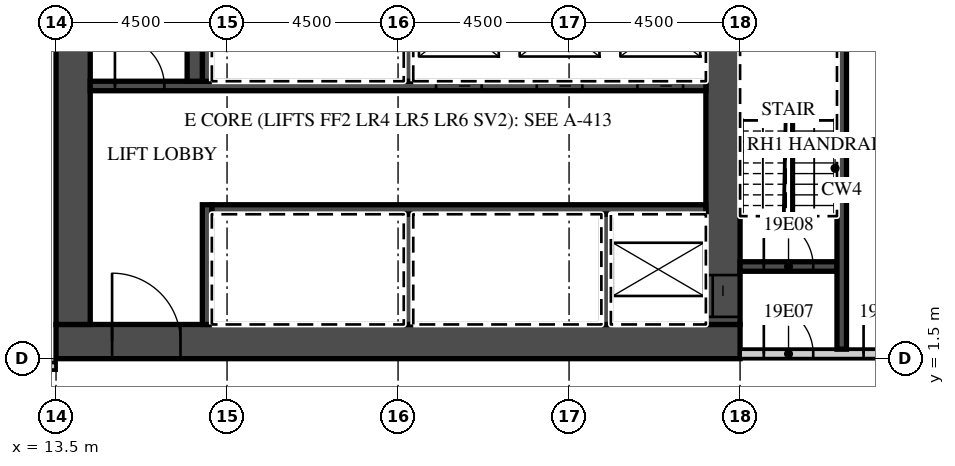
"""IFC4 building model, lengths in metres.
Left out: names, types, materials, properties, quantities, classifications, styles, units other than length and angle.
Written with IfcOpenShell. Run it as: python <this file> out.ifc"""

import sys

from ifc_helpers import new_model, si_unit, direction, frame, frame_2d, origin, place, context, subcontext, project, spatial, rectangle, extrude, element, fill, save


model = new_model("IFC4")
c1 = context("Model", 3, precision=1e-05, world=origin(), true_north=direction((0.0, 1.0)))
c2 = subcontext(c1, "Body", "Model", "MODEL_VIEW")
j1 = project(units=[si_unit("LENGTHUNIT", "METRE"), si_unit("PLANEANGLEUNIT", "RADIAN")], contexts=[c1])
p1 = place(None, origin())
s1 = spatial("IfcSite", under=j1, at=p1, CompositionType="ELEMENT")
p2 = place(p1, origin())
s2 = spatial("IfcBuilding", under=s1, at=p2, CompositionType="ELEMENT")
p3 = place(p2, frame((0.0, 0.0, 93.0)))
s3 = spatial("IfcBuildingStorey", under=s2, at=p3, CompositionType="ELEMENT", Elevation=93.0)
p4 = place(p3, frame((-44.55, 1.3, 0.0), z_axis=(0.0, 0.0, 1.0), x_axis=(1.0, 0.0, 0.0)))
e1 = element("IfcWall", 1, at=p4, inside=s3, PredefinedType="PARTITIONING", context=c2, shape_type="SweptSolid", body=[
    extrude(rectangle(XDim=58.05, YDim=0.2, at=frame_2d((29.025, 0.0))), origin(), (0.0, 0.0, 1.0), 3.02),
])
p5 = place(p4, frame((0.525, 0.0, 0.0)))
e2 = element("IfcOpeningElement", 2, at=p5, cuts=e1, PredefinedType="OPENING", context=c2, shape_type="SweptSolid", body=[
    extrude(rectangle(XDim=1.0, YDim=2.1, at=frame_2d((0.5, 1.05))), frame((0.0, 0.11, 0.0), z_axis=(0.0, -1.0, 0.0), x_axis=(1.0, 0.0, 0.0)), (0.0, 0.0, 1.0), 0.22),
])
p6 = place(p4, frame((4.625, 0.0, 0.0)))
e3 = element("IfcOpeningElement", 3, at=p6, cuts=e1, PredefinedType="OPENING", context=c2, shape_type="SweptSolid", body=[
    extrude(rectangle(XDim=1.0, YDim=2.1, at=frame_2d((0.5, 1.05))), frame((0.0, 0.11, 0.0), z_axis=(0.0, -1.0, 0.0), x_axis=(1.0, 0.0, 0.0)), (0.0, 0.0, 1.0), 0.22),
])
p7 = place(p4, frame((10.987, 0.0, 0.0)))
e4 = element("IfcOpeningElement", 4, at=p7, cuts=e1, PredefinedType="OPENING", context=c2, shape_type="SweptSolid", body=[
    extrude(rectangle(XDim=1.2, YDim=2.1, at=frame_2d((0.6, 1.05))), frame((0.0, 0.11, 0.0), z_axis=(0.0, -1.0, 0.0), x_axis=(1.0, 0.0, 0.0)), (0.0, 0.0, 1.0), 0.22),
])
p8 = place(p4, frame((22.912, 0.0, 0.0)))
e5 = element("IfcOpeningElement", 5, at=p8, cuts=e1, PredefinedType="OPENING", context=c2, shape_type="SweptSolid", body=[
    extrude(rectangle(XDim=1.2, YDim=2.1, at=frame_2d((0.6, 1.05))), frame((0.0, 0.11, 0.0), z_axis=(0.0, -1.0, 0.0), x_axis=(1.0, 0.0, 0.0)), (0.0, 0.0, 1.0), 0.22),
])
p9 = place(p4, frame((28.987, 0.0, 0.0)))
e6 = element("IfcOpeningElement", 6, at=p9, cuts=e1, PredefinedType="OPENING", context=c2, shape_type="SweptSolid", body=[
    extrude(rectangle(XDim=1.2, YDim=2.1, at=frame_2d((0.6, 1.05))), frame((0.0, 0.11, 0.0), z_axis=(0.0, -1.0, 0.0), x_axis=(1.0, 0.0, 0.0)), (0.0, 0.0, 1.0), 0.22),
])
p10 = place(p4, frame((36.125, 0.0, 0.0)))
e7 = element("IfcOpeningElement", 7, at=p10, cuts=e1, PredefinedType="OPENING", context=c2, shape_type="SweptSolid", body=[
    extrude(rectangle(XDim=1.0, YDim=2.1, at=frame_2d((0.5, 1.05))), frame((0.0, 0.11, 0.0), z_axis=(0.0, -1.0, 0.0), x_axis=(1.0, 0.0, 0.0)), (0.0, 0.0, 1.0), 0.22),
])
p11 = place(p4, frame((42.975, 0.0, 0.0)))
e8 = element("IfcOpeningElement", 8, at=p11, cuts=e1, PredefinedType="OPENING", context=c2, shape_type="SweptSolid", body=[
    extrude(rectangle(XDim=1.0, YDim=2.1, at=frame_2d((0.5, 1.05))), frame((0.0, 0.11, 0.0), z_axis=(0.0, -1.0, 0.0), x_axis=(1.0, 0.0, 0.0)), (0.0, 0.0, 1.0), 0.22),
])
p12 = place(p4, frame((47.5, 0.0, 0.0)))
e9 = element("IfcOpeningElement", 9, at=p12, cuts=e1, PredefinedType="OPENING", context=c2, shape_type="SweptSolid", body=[
    extrude(rectangle(XDim=1.0, YDim=2.1, at=frame_2d((0.5, 1.05))), frame((0.0, 0.11, 0.0), z_axis=(0.0, -1.0, 0.0), x_axis=(1.0, 0.0, 0.0)), (0.0, 0.0, 1.0), 0.22),
])
p13 = place(p4, frame((49.6, 0.0, 0.0)))
e10 = element("IfcOpeningElement", 10, at=p13, cuts=e1, PredefinedType="OPENING", context=c2, shape_type="SweptSolid", body=[
    extrude(rectangle(XDim=1.0, YDim=2.1, at=frame_2d((0.5, 1.05))), frame((0.0, 0.11, 0.0), z_axis=(0.0, -1.0, 0.0), x_axis=(1.0, 0.0, 0.0)), (0.0, 0.0, 1.0), 0.22),
])
p14 = place(p4, frame((56.475, 0.0, 0.0)))
e11 = element("IfcOpeningElement", 11, at=p14, cuts=e1, PredefinedType="OPENING", context=c2, shape_type="SweptSolid", body=[
    extrude(rectangle(XDim=1.0, YDim=2.1, at=frame_2d((0.5, 1.05))), frame((0.0, 0.11, 0.0), z_axis=(0.0, -1.0, 0.0), x_axis=(1.0, 0.0, 0.0)), (0.0, 0.0, 1.0), 0.22),
])
p15 = place(p3, frame((13.5, 1.95, 0.0), z_axis=(0.0, 0.0, 1.0), x_axis=(1.0, 0.0, 0.0)))
e12 = element("IfcWall", 12, at=p15, inside=s3, PredefinedType="SHEAR", context=c2, shape_type="SweptSolid", body=[
    extrude(rectangle(XDim=18.0, YDim=0.9, at=frame_2d((9.0, 0.0))), origin(), (0.0, 0.0, 1.0), 3.02),
])
p16 = place(p15, frame((1.475, 0.0, 0.0)))
e13 = element("IfcOpeningElement", 13, at=p16, cuts=e12, PredefinedType="OPENING", context=c2, shape_type="SweptSolid", body=[
    extrude(rectangle(XDim=1.8, YDim=2.1, at=frame_2d((0.9, 1.05))), frame((0.0, 0.46, 0.0), z_axis=(0.0, -1.0, 0.0), x_axis=(1.0, 0.0, 0.0)), (0.0, 0.0, 1.0), 0.92),
])
p17 = place(p3, frame((31.05, 2.4, 0.0), z_axis=(0.0, 0.0, 1.0), x_axis=(0.0, 1.0, 0.0)))
e14 = element("IfcWall", 14, at=p17, inside=s3, PredefinedType="SHEAR", context=c2, shape_type="SweptSolid", body=[
    extrude(rectangle(XDim=12.8, YDim=0.9, at=frame_2d((6.4, 0.0))), origin(), (0.0, 0.0, 1.0), 3.02),
])
p18 = place(p17, frame((0.2, 0.0, 0.0)))
e15 = element("IfcOpeningElement", 15, at=p18, cuts=e14, PredefinedType="OPENING", context=c2, shape_type="SweptSolid", body=[
    extrude(rectangle(XDim=1.1, YDim=2.1, at=frame_2d((0.55, 1.05))), frame((0.0, 0.46, 0.0), z_axis=(0.0, -1.0, 0.0), x_axis=(1.0, 0.0, 0.0)), (0.0, 0.0, 1.0), 0.92),
])
p19 = place(p3, frame((13.95, 2.4, 0.0), z_axis=(0.0, 0.0, 1.0), x_axis=(0.0, 1.0, 0.0)))
e16 = element("IfcWall", 16, at=p19, inside=s3, PredefinedType="SHEAR", context=c2, shape_type="SweptSolid", body=[
    extrude(rectangle(XDim=12.2, YDim=0.9, at=frame_2d((6.1, 0.0))), origin(), (0.0, 0.0, 1.0), 3.02),
])
p20 = place(p3, frame((17.6, 5.425, 0.0), z_axis=(0.0, 0.0, 1.0), x_axis=(1.0, 0.0, 0.0)))
e17 = element("IfcWall", 17, at=p20, inside=s3, PredefinedType="SHEAR", context=c2, shape_type="SweptSolid", body=[
    extrude(rectangle(XDim=13.0, YDim=0.25, at=frame_2d((6.5, 0.0))), origin(), (0.0, 0.0, 1.0), 3.02),
])
p21 = place(p3, frame((17.475, 2.4, 0.0), z_axis=(0.0, 0.0, 1.0), x_axis=(0.0, 1.0, 0.0)))
e18 = element("IfcWall", 18, at=p21, inside=s3, PredefinedType="SHEAR", context=c2, shape_type="SweptSolid", body=[
    extrude(rectangle(XDim=3.15, YDim=0.25, at=frame_2d((1.575, 0.0))), origin(), (0.0, 0.0, 1.0), 3.02),
])
for number, where, z_axis, x_axis in (
    (19, (27.975, 2.4, 0.0), (0.0, 0.0, 1.0), (0.0, 1.0, 0.0)),
    (20, (22.775, 2.4, 0.0), (0.0, 0.0, 1.0), (0.0, 1.0, 0.0)),
):
    element("IfcWall", number, at=place(p3, frame(where, z_axis=z_axis, x_axis=x_axis)), inside=s3, PredefinedType="SHEAR", context=c2, shape_type="SweptSolid", body=[
        extrude(rectangle(XDim=2.9, YDim=0.25, at=frame_2d((1.45, 0.0))), origin(), (0.0, 0.0, 1.0), 3.02),
    ])
p22 = place(p3, frame((14.4, 8.675, 0.0), z_axis=(0.0, 0.0, 1.0), x_axis=(1.0, 0.0, 0.0)))
e21 = element("IfcWall", 21, at=p22, inside=s3, PredefinedType="SHEAR", context=c2, shape_type="SweptSolid", body=[
    extrude(rectangle(XDim=16.2, YDim=0.25, at=frame_2d((8.1, 0.0))), origin(), (0.0, 0.0, 1.0), 3.02),
])
p23 = place(p22, frame((14.4, 0.0, 0.0)))
e22 = element("IfcOpeningElement", 22, at=p23, cuts=e21, PredefinedType="OPENING", context=c2, shape_type="SweptSolid", body=[
    extrude(rectangle(XDim=1.2, YDim=2.1, at=frame_2d((0.6, 1.05))), frame((0.0, 0.135, 0.0), z_axis=(0.0, -1.0, 0.0), x_axis=(1.0, 0.0, 0.0)), (0.0, 0.0, 1.0), 0.27),
])
p24 = place(p22, frame((11.75, 0.0, 0.0)))
e23 = element("IfcOpeningElement", 23, at=p24, cuts=e21, PredefinedType="OPENING", context=c2, shape_type="SweptSolid", body=[
    extrude(rectangle(XDim=1.2, YDim=2.1, at=frame_2d((0.6, 1.05))), frame((0.0, 0.135, 0.0), z_axis=(0.0, -1.0, 0.0), x_axis=(1.0, 0.0, 0.0)), (0.0, 0.0, 1.0), 0.27),
])
p25 = place(p22, frame((9.1, 0.0, 0.0)))
e24 = element("IfcOpeningElement", 24, at=p25, cuts=e21, PredefinedType="OPENING", context=c2, shape_type="SweptSolid", body=[
    extrude(rectangle(XDim=1.2, YDim=2.1, at=frame_2d((0.6, 1.05))), frame((0.0, 0.135, 0.0), z_axis=(0.0, -1.0, 0.0), x_axis=(1.0, 0.0, 0.0)), (0.0, 0.0, 1.0), 0.27),
])
p26 = place(p22, frame((0.65, 0.0, 0.0)))
e25 = element("IfcOpeningElement", 25, at=p26, cuts=e21, PredefinedType="OPENING", context=c2, shape_type="SweptSolid", body=[
    extrude(rectangle(XDim=1.3, YDim=2.1, at=frame_2d((0.65, 1.05))), frame((0.0, 0.135, 0.0), z_axis=(0.0, -1.0, 0.0), x_axis=(1.0, 0.0, 0.0)), (0.0, 0.0, 1.0), 0.27),
])
for number, where, z_axis, x_axis in (
    (26, (17.475, 8.8, 0.0), (0.0, 0.0, 1.0), (0.0, 1.0, 0.0)),
    (27, (22.775, 8.8, 0.0), (0.0, 0.0, 1.0), (0.0, 1.0, 0.0)),
):
    element("IfcWall", number, at=place(p3, frame(where, z_axis=z_axis, x_axis=x_axis)), inside=s3, PredefinedType="SHEAR", context=c2, shape_type="SweptSolid", body=[
        extrude(rectangle(XDim=2.9, YDim=0.25, at=frame_2d((1.45, 0.0))), origin(), (0.0, 0.0, 1.0), 3.02),
    ])
p27 = place(p3, frame((17.15, 8.8, 0.0), z_axis=(0.0, 0.0, 1.0), x_axis=(0.0, 1.0, 0.0)))
e28 = element("IfcWall", 28, at=p27, inside=s3, PredefinedType="SHEAR", context=c2, shape_type="SweptSolid", body=[
    extrude(rectangle(XDim=5.8, YDim=0.4, at=frame_2d((2.9, 0.0))), origin(), (0.0, 0.0, 1.0), 3.02),
])
p28 = place(p3, frame((31.5, 1.625, 0.0), z_axis=(0.0, 0.0, 1.0), x_axis=(1.0, 0.0, 0.0)))
e29 = element("IfcWall", 29, at=p28, inside=s3, PredefinedType="PARTITIONING", context=c2, shape_type="SweptSolid", body=[
    extrude(rectangle(XDim=13.05, YDim=0.25, at=frame_2d((6.525, 0.0))), origin(), (0.0, 0.0, 1.0), 3.02),
])
p29 = place(p28, frame((0.625, 0.0, 0.0)))
e30 = element("IfcOpeningElement", 30, at=p29, cuts=e29, PredefinedType="OPENING", context=c2, shape_type="SweptSolid", body=[
    extrude(rectangle(XDim=1.3, YDim=2.1, at=frame_2d((0.65, 1.05))), frame((0.0, 0.135, 0.0), z_axis=(0.0, -1.0, 0.0), x_axis=(1.0, 0.0, 0.0)), (0.0, 0.0, 1.0), 0.27),
])
p30 = place(p28, frame((3.25, 0.0, 0.0)))
e31 = element("IfcOpeningElement", 31, at=p30, cuts=e29, PredefinedType="OPENING", context=c2, shape_type="SweptSolid", body=[
    extrude(rectangle(XDim=1.1, YDim=2.1, at=frame_2d((0.55, 1.05))), frame((0.0, 0.135, 0.0), z_axis=(0.0, -1.0, 0.0), x_axis=(1.0, 0.0, 0.0)), (0.0, 0.0, 1.0), 0.27),
])
p31 = place(p3, frame((31.5, 3.925, 0.0), z_axis=(0.0, 0.0, 1.0), x_axis=(1.0, 0.0, 0.0)))
e32 = element("IfcWall", 32, at=p31, inside=s3, PredefinedType="SHEAR", context=c2, shape_type="SweptSolid", body=[
    extrude(rectangle(XDim=2.55, YDim=0.25, at=frame_2d((1.275, 0.0))), origin(), (0.0, 0.0, 1.0), 3.02),
])
p32 = place(p31, frame((0.625, 0.0, 0.0)))
e33 = element("IfcOpeningElement", 33, at=p32, cuts=e32, PredefinedType="OPENING", context=c2, shape_type="SweptSolid", body=[
    extrude(rectangle(XDim=1.3, YDim=2.1, at=frame_2d((0.65, 1.05))), frame((0.0, 0.135, 0.0), z_axis=(0.0, -1.0, 0.0), x_axis=(1.0, 0.0, 0.0)), (0.0, 0.0, 1.0), 0.27),
])
p33 = place(p3, frame((34.175, 1.75, 0.0), z_axis=(0.0, 0.0, 1.0), x_axis=(0.0, 1.0, 0.0)))
e34 = element("IfcWall", 34, at=p33, inside=s3, PredefinedType="SHEAR", context=c2, shape_type="SweptSolid", body=[
    extrude(rectangle(XDim=8.35, YDim=0.25, at=frame_2d((4.175, 0.0))), origin(), (0.0, 0.0, 1.0), 3.02),
])
p34 = place(p23, origin())
e35 = element("IfcDoor", 35, at=p34, inside=s3, OperationType="SLIDING_TO_LEFT", PredefinedType="DOOR", context=c2, shape_type="SweptSolid", body=[
    extrude(rectangle(XDim=1.2, YDim=2.1, at=frame_2d((0.6, 1.05))), frame((0.0, 0.025, 0.0), z_axis=(0.0, -1.0, 0.0), x_axis=(1.0, 0.0, 0.0)), (0.0, 0.0, 1.0), 0.05),
])
fill(e22, e35)
p35 = place(p24, origin())
e36 = element("IfcDoor", 36, at=p35, inside=s3, OperationType="SLIDING_TO_RIGHT", PredefinedType="DOOR", context=c2, shape_type="SweptSolid", body=[
    extrude(rectangle(XDim=1.2, YDim=2.1, at=frame_2d((0.6, 1.05))), frame((0.0, 0.025, 0.0), z_axis=(0.0, -1.0, 0.0), x_axis=(1.0, 0.0, 0.0)), (0.0, 0.0, 1.0), 0.05),
])
fill(e23, e36)
p36 = place(p25, origin())
e37 = element("IfcDoor", 37, at=p36, inside=s3, OperationType="SLIDING_TO_RIGHT", PredefinedType="DOOR", context=c2, shape_type="SweptSolid", body=[
    extrude(rectangle(XDim=1.2, YDim=2.1, at=frame_2d((0.6, 1.05))), frame((0.0, 0.025, 0.0), z_axis=(0.0, -1.0, 0.0), x_axis=(1.0, 0.0, 0.0)), (0.0, 0.0, 1.0), 0.05),
])
fill(e24, e37)
p37 = place(p18, origin())
e38 = element("IfcDoor", 38, at=p37, inside=s3, OperationType="SLIDING_TO_LEFT", PredefinedType="DOOR", context=c2, shape_type="SweptSolid", body=[
    extrude(rectangle(XDim=1.1, YDim=2.1, at=frame_2d((0.55, 1.05))), frame((0.0, 0.025, 0.0), z_axis=(0.0, -1.0, 0.0), x_axis=(1.0, 0.0, 0.0)), (0.0, 0.0, 1.0), 0.05),
])
fill(e15, e38)
p38 = place(p16, origin())
e39 = element("IfcDoor", 39, at=p38, inside=s3, OperationType="DOUBLE_DOOR_DOUBLE_SWING", PredefinedType="DOOR", context=c2, shape_type="SweptSolid", body=[
    extrude(rectangle(XDim=1.8, YDim=2.1, at=frame_2d((0.9, 1.05))), frame((0.0, 0.025, 0.0), z_axis=(0.0, -1.0, 0.0), x_axis=(1.0, 0.0, 0.0)), (0.0, 0.0, 1.0), 0.05),
])
fill(e13, e39)
p39 = place(p29, origin())
e40 = element("IfcDoor", 40, at=p39, inside=s3, OperationType="SINGLE_SWING_LEFT", PredefinedType="DOOR", context=c2, shape_type="SweptSolid", body=[
    extrude(rectangle(XDim=1.3, YDim=2.1, at=frame_2d((0.65, 1.05))), frame((0.0, 0.025, 0.0), z_axis=(0.0, -1.0, 0.0), x_axis=(1.0, 0.0, 0.0)), (0.0, 0.0, 1.0), 0.05),
])
fill(e30, e40)
p40 = place(p32, origin())
e41 = element("IfcDoor", 41, at=p40, inside=s3, OperationType="SINGLE_SWING_LEFT", PredefinedType="DOOR", context=c2, shape_type="SweptSolid", body=[
    extrude(rectangle(XDim=1.3, YDim=2.1, at=frame_2d((0.65, 1.05))), frame((0.0, 0.025, 0.0), z_axis=(0.0, -1.0, 0.0), x_axis=(1.0, 0.0, 0.0)), (0.0, 0.0, 1.0), 0.05),
])
fill(e33, e41)
p41 = place(p30, origin())
e42 = element("IfcDoor", 42, at=p41, inside=s3, OperationType="SINGLE_SWING_LEFT", PredefinedType="DOOR", context=c2, shape_type="SweptSolid", body=[
    extrude(rectangle(XDim=1.1, YDim=2.1, at=frame_2d((0.55, 1.05))), frame((0.0, 0.025, 0.0), z_axis=(0.0, -1.0, 0.0), x_axis=(1.0, 0.0, 0.0)), (0.0, 0.0, 1.0), 0.05),
])
fill(e31, e42)
p42 = place(p26, origin())
e43 = element("IfcDoor", 43, at=p42, inside=s3, OperationType="SINGLE_SWING_LEFT", PredefinedType="DOOR", context=c2, shape_type="SweptSolid", body=[
    extrude(rectangle(XDim=1.3, YDim=2.1, at=frame_2d((0.65, 1.05))), frame((0.0, 0.025, 0.0), z_axis=(0.0, -1.0, 0.0), x_axis=(1.0, 0.0, 0.0)), (0.0, 0.0, 1.0), 0.05),
])
fill(e25, e43)
save(model, sys.argv[1])
